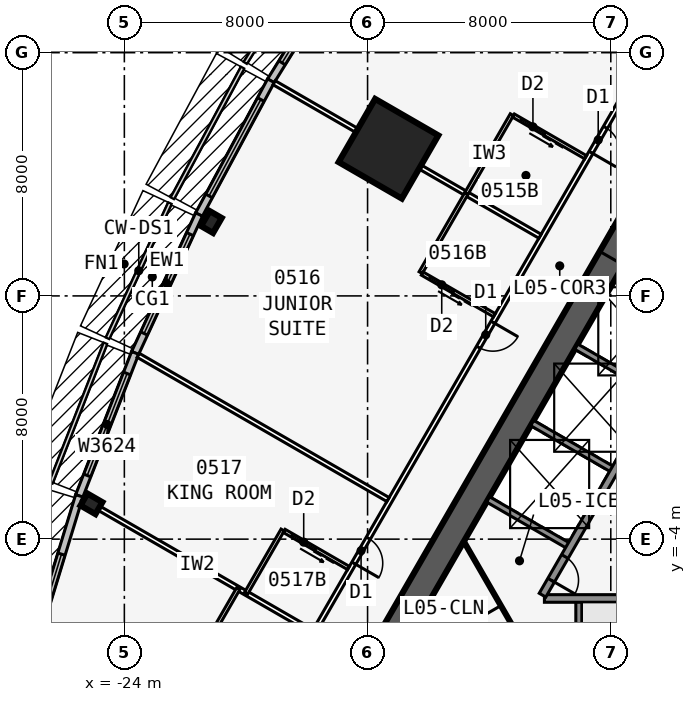
"""IFC4 building model, lengths in metres.
Left out: names, types, materials, properties, quantities, classifications, styles, units other than length and angle.
Written with IfcOpenShell. Run it as: python <this file> out.ifc"""

import sys

from ifc_helpers import new_model, si_unit, direction, frame, frame_2d, origin, origin_2d, place, context, subcontext, project, spatial, rectangle, i_section, extrude, element, fill, save


model = new_model("IFC4")
c1 = context("Model", 3, precision=1e-05, world=origin(), true_north=direction((0.0, 1.0)))
c2 = subcontext(c1, "Body", "Model", "MODEL_VIEW")
j1 = project(units=[si_unit("LENGTHUNIT", "METRE"), si_unit("PLANEANGLEUNIT", "RADIAN")], contexts=[c1])
p1 = place(None, origin())
s1 = spatial("IfcSite", under=j1, at=p1, CompositionType="ELEMENT")
p2 = place(p1, origin())
s2 = spatial("IfcBuilding", under=s1, at=p2, CompositionType="ELEMENT")
p3 = place(p2, frame((0.0, 0.0, 28.5)))
s3 = spatial("IfcBuildingStorey", under=s2, at=p3, CompositionType="ELEMENT", Elevation=28.5)
p4 = place(p3, frame((-10.183, -5.951, 0.0), z_axis=(0.0, 0.0, 1.0), x_axis=(1.0, 0.0, 0.0)))
e1 = element("IfcWall", 1, at=p4, inside=s3, PredefinedType="SOLIDWALL", context=c2, shape_type="SweptSolid", body=[
    extrude(rectangle(XDim=7.633, YDim=0.25, at=frame_2d((3.816, 0.0))), origin(), (0.0, 0.0, 1.0), 3.235),
])
p5 = place(p3, frame((-9.05, -5.951, 0.0), z_axis=(0.0, 0.0, 1.0), x_axis=(0.0, -1.0, 0.0)))
e2 = element("IfcWall", 2, at=p5, inside=s3, PredefinedType="SOLIDWALL", context=c2, shape_type="SweptSolid", body=[
    extrude(rectangle(XDim=3.125, YDim=0.2, at=frame_2d((1.562, 0.0))), origin(), (0.0, 0.0, 1.0), 3.235),
])
p6 = place(p3, frame((0.0, 19.052, 0.0), z_axis=(0.0, 0.0, 1.0), x_axis=(-0.499999749417, -0.866025548458, 0.0)))
e3 = element("IfcWall", 3, at=p6, inside=s3, PredefinedType="SHEAR", context=c2, shape_type="SweptSolid", body=[
    extrude(rectangle(XDim=33.0, YDim=0.9, at=frame_2d((16.5, 0.0))), origin(), (0.0, 0.0, 1.0), 3.4),
])
p7 = place(p6, frame((14.15, 0.0, 0.0)))
e4 = element("IfcOpeningElement", 4, at=p7, cuts=e3, PredefinedType="OPENING", context=c2, shape_type="SweptSolid", body=[
    extrude(rectangle(XDim=1.8, YDim=2.13, at=frame_2d((0.9, 1.065))), frame((0.0, 0.46, 0.0), z_axis=(0.0, -1.0, 0.0), x_axis=(1.0, 0.0, 0.0)), (0.0, 0.0, 1.0), 0.92),
])
p8 = place(p6, frame((12.6, 0.0, 0.0)))
e5 = element("IfcOpeningElement", 5, at=p8, cuts=e3, PredefinedType="OPENING", context=c2, shape_type="SweptSolid", body=[
    extrude(rectangle(XDim=1.0, YDim=2.13, at=frame_2d((0.5, 1.065))), frame((0.0, 0.46, 0.0), z_axis=(0.0, -1.0, 0.0), x_axis=(1.0, 0.0, 0.0)), (0.0, 0.0, 1.0), 0.92),
])
p9 = place(p3, frame((-4.929, 3.365, 0.0), z_axis=(0.0, 0.0, 1.0), x_axis=(-0.499991433582, -0.866030349552, 0.0)))
e6 = element("IfcWall", 6, at=p9, inside=s3, PredefinedType="SOLIDWALL", context=c2, shape_type="SweptSolid", body=[
    extrude(rectangle(XDim=10.633, YDim=0.25, at=frame_2d((5.316, 0.0))), origin(), (0.0, 0.0, 1.0), 3.235),
])
p10 = place(p9, frame((9.164, 0.0, 0.0)))
e7 = element("IfcOpeningElement", 7, at=p10, cuts=e6, PredefinedType="OPENING", context=c2, shape_type="SweptSolid", body=[
    extrude(rectangle(XDim=0.9, YDim=2.13, at=frame_2d((0.45, 1.065))), frame((0.0, 0.135, 0.0), z_axis=(0.0, -1.0, 0.0), x_axis=(1.0, 0.0, 0.0)), (0.0, 0.0, 1.0), 0.27),
])
for number, where, z_axis, x_axis in (
    (8, (-6.429, 0.767, 0.0), (0.0, 0.0, 1.0), (-0.866, 0.5, 0.0)),
    (9, (-7.879, -1.744, 0.0), (0.0, 0.0, 1.0), (-0.866, 0.5, 0.0)),
    (10, (-9.329, -4.256, 0.0), (0.0, 0.0, 1.0), (-0.866, 0.5, 0.0)),
):
    element("IfcWall", number, at=place(p3, frame(where, z_axis=z_axis, x_axis=x_axis)), inside=s3, PredefinedType="SOLIDWALL", context=c2, shape_type="SweptSolid", body=[
        extrude(rectangle(XDim=3.125, YDim=0.2, at=frame_2d((1.562, 0.0))), origin(), (0.0, 0.0, 1.0), 3.235),
    ])
for number, where, z_axis, x_axis in (
    (11, (-21.137, 6.43, 0.0), (0.0, 0.0, 1.0), (-0.866, 0.5, 0.0)),
    (12, (-25.083, -2.839, 0.0), (0.0, 0.0, 1.0), (-0.5, -0.866, 0.0)),
):
    element("IfcColumn", number, at=place(p3, frame(where, z_axis=z_axis, x_axis=x_axis)), inside=s3, PredefinedType="COLUMN", context=c2, shape_type="SweptSolid", body=[
        extrude(i_section(OverallWidth=0.455, OverallDepth=0.569, WebThickness=0.078, FlangeThickness=0.125, at=origin_2d()), origin(), (0.0, 0.0, 1.0), 3.4),
    ])
p11 = place(p3, frame((-15.312, 8.84, 0.0), z_axis=(0.0, 0.0, 1.0), x_axis=(-0.866025403784, 0.5, 0.0)))
e13 = element("IfcColumn", 13, at=p11, inside=s3, PredefinedType="COLUMN", context=c2, shape_type="SweptSolid", body=[
    extrude(rectangle(XDim=2.4, YDim=2.4, at=origin_2d()), origin(), (0.0, 0.0, 1.0), 3.4),
])
p12 = place(p3, frame((-16.551, 15.324, 0.0), z_axis=(0.0, 0.0, 1.0), x_axis=(-0.526132807704, -0.850402415717, 0.0)))
e14 = element("IfcWall", 14, at=p12, inside=s3, PredefinedType="STANDARD", context=c2, shape_type="SweptSolid", body=[
    extrude(rectangle(XDim=5.002, YDim=0.25, at=frame_2d((2.501, 0.0))), origin(), (0.0, 0.0, 1.0), 3.235),
])
p13 = place(p12, frame((0.701, 0.0, 0.45)))
e15 = element("IfcOpeningElement", 15, at=p13, cuts=e14, PredefinedType="OPENING", context=c2, shape_type="SweptSolid", body=[
    extrude(rectangle(XDim=3.6, YDim=2.4, at=frame_2d((1.8, 1.2))), frame((0.0, 0.135, 0.0), z_axis=(0.0, -1.0, 0.0), x_axis=(1.0, 0.0, 0.0)), (0.0, 0.0, 1.0), 0.27),
])
p14 = place(p3, frame((-19.178, 11.077, 0.0), z_axis=(0.0, 0.0, 1.0), x_axis=(-0.473412820489, -0.880840678782, 0.0)))
e16 = element("IfcWall", 16, at=p14, inside=s3, PredefinedType="STANDARD", context=c2, shape_type="SweptSolid", body=[
    extrude(rectangle(XDim=5.002, YDim=0.25, at=frame_2d((2.501, 0.0))), origin(), (0.0, 0.0, 1.0), 3.235),
])
p15 = place(p14, frame((0.701, 0.0, 0.45)))
e17 = element("IfcOpeningElement", 17, at=p15, cuts=e16, PredefinedType="OPENING", context=c2, shape_type="SweptSolid", body=[
    extrude(rectangle(XDim=3.6, YDim=2.4, at=frame_2d((1.8, 1.2))), frame((0.0, 0.135, 0.0), z_axis=(0.0, -1.0, 0.0), x_axis=(1.0, 0.0, 0.0)), (0.0, 0.0, 1.0), 0.27),
])
p16 = place(p3, frame((-21.543, 6.678, 0.0), z_axis=(0.0, 0.0, 1.0), x_axis=(-0.419203100754, -0.907892482796, 0.0)))
e18 = element("IfcWall", 18, at=p16, inside=s3, PredefinedType="STANDARD", context=c2, shape_type="SweptSolid", body=[
    extrude(rectangle(XDim=5.021, YDim=0.25, at=frame_2d((2.51, 0.0))), origin(), (0.0, 0.0, 1.0), 3.235),
])
p17 = place(p16, frame((0.71, 0.0, 0.45)))
e19 = element("IfcOpeningElement", 19, at=p17, cuts=e18, PredefinedType="OPENING", context=c2, shape_type="SweptSolid", body=[
    extrude(rectangle(XDim=3.6, YDim=2.4, at=frame_2d((1.8, 1.2))), frame((0.0, 0.135, 0.0), z_axis=(0.0, -1.0, 0.0), x_axis=(1.0, 0.0, 0.0)), (0.0, 0.0, 1.0), 0.27),
])
p18 = place(p3, frame((-23.645, 2.126, 0.0), z_axis=(0.0, 0.0, 1.0), x_axis=(-0.364013463868, -0.931393685894, 0.0)))
e20 = element("IfcWall", 20, at=p18, inside=s3, PredefinedType="STANDARD", context=c2, shape_type="SweptSolid", body=[
    extrude(rectangle(XDim=5.058, YDim=0.25, at=frame_2d((2.529, 0.0))), origin(), (0.0, 0.0, 1.0), 3.235),
])
p19 = place(p18, frame((0.729, 0.0, 0.45)))
e21 = element("IfcOpeningElement", 21, at=p19, cuts=e20, PredefinedType="OPENING", context=c2, shape_type="SweptSolid", body=[
    extrude(rectangle(XDim=3.6, YDim=2.4, at=frame_2d((1.8, 1.2))), frame((0.0, 0.135, 0.0), z_axis=(0.0, -1.0, 0.0), x_axis=(1.0, 0.0, 0.0)), (0.0, 0.0, 1.0), 0.27),
])
p20 = place(p3, frame((-25.483, -2.575, 0.0), z_axis=(0.0, 0.0, 1.0), x_axis=(-0.2919790669, -0.956424709265, 0.0)))
e22 = element("IfcWall", 22, at=p20, inside=s3, PredefinedType="STANDARD", context=c2, shape_type="SweptSolid", body=[
    extrude(rectangle(XDim=8.211, YDim=0.25, at=frame_2d((4.105, 0.0))), origin(), (0.0, 0.0, 1.0), 3.235),
])
p21 = place(p20, frame((2.006, 0.0, 0.45)))
e23 = element("IfcOpeningElement", 23, at=p21, cuts=e22, PredefinedType="OPENING", context=c2, shape_type="SweptSolid", body=[
    extrude(rectangle(XDim=4.2, YDim=2.4, at=frame_2d((2.1, 1.2))), frame((0.0, 0.135, 0.0), z_axis=(0.0, -1.0, 0.0), x_axis=(1.0, 0.0, 0.0)), (0.0, 0.0, 1.0), 0.27),
])
p22 = place(p3, frame((-0.5, 22.836, 0.0), z_axis=(0.0, 0.0, 1.0), x_axis=(-0.500001677587, -0.866024435227, 0.0)))
e24 = element("IfcWall", 24, at=p22, inside=s3, PredefinedType="PARTITIONING", context=c2, shape_type="SweptSolid", body=[
    extrude(rectangle(XDim=39.054, YDim=0.15, at=frame_2d((19.527, 0.0))), origin(), (0.0, 0.0, 1.0), 3.235),
])
p23 = place(p22, frame((1.558, 0.0, 0.0)))
e25 = element("IfcOpeningElement", 25, at=p23, cuts=e24, PredefinedType="OPENING", context=c2, shape_type="SweptSolid", body=[
    extrude(rectangle(XDim=0.95, YDim=2.13, at=frame_2d((0.475, 1.065))), frame((0.0, 0.085, 0.0), z_axis=(0.0, -1.0, 0.0), x_axis=(1.0, 0.0, 0.0)), (0.0, 0.0, 1.0), 0.17),
])
p24 = place(p22, frame((15.352, 0.0, 0.0)))
e26 = element("IfcOpeningElement", 26, at=p24, cuts=e24, PredefinedType="OPENING", context=c2, shape_type="SweptSolid", body=[
    extrude(rectangle(XDim=0.95, YDim=2.13, at=frame_2d((0.475, 1.065))), frame((0.0, 0.085, 0.0), z_axis=(0.0, -1.0, 0.0), x_axis=(1.0, 0.0, 0.0)), (0.0, 0.0, 1.0), 0.17),
])
p25 = place(p22, frame((22.752, 0.0, 0.0)))
e27 = element("IfcOpeningElement", 27, at=p25, cuts=e24, PredefinedType="OPENING", context=c2, shape_type="SweptSolid", body=[
    extrude(rectangle(XDim=0.95, YDim=2.13, at=frame_2d((0.475, 1.065))), frame((0.0, 0.085, 0.0), z_axis=(0.0, -1.0, 0.0), x_axis=(1.0, 0.0, 0.0)), (0.0, 0.0, 1.0), 0.17),
])
p26 = place(p22, frame((30.952, 0.0, 0.0)))
e28 = element("IfcOpeningElement", 28, at=p26, cuts=e24, PredefinedType="OPENING", context=c2, shape_type="SweptSolid", body=[
    extrude(rectangle(XDim=0.95, YDim=2.13, at=frame_2d((0.475, 1.065))), frame((0.0, 0.085, 0.0), z_axis=(0.0, -1.0, 0.0), x_axis=(1.0, 0.0, 0.0)), (0.0, 0.0, 1.0), 0.17),
])
p27 = place(p22, frame((37.752, 0.0, 0.0)))
e29 = element("IfcOpeningElement", 29, at=p27, cuts=e24, PredefinedType="OPENING", context=c2, shape_type="SweptSolid", body=[
    extrude(rectangle(XDim=0.95, YDim=2.13, at=frame_2d((0.475, 1.065))), frame((0.0, 0.085, 0.0), z_axis=(0.0, -1.0, 0.0), x_axis=(1.0, 0.0, 0.0)), (0.0, 0.0, 1.0), 0.17),
])
p28 = place(p3, frame((-10.329, 5.963, 0.0), z_axis=(0.0, 0.0, 1.0), x_axis=(-0.866021688545, 0.500006434927, 0.0)))
e30 = element("IfcWall", 30, at=p28, inside=s3, PredefinedType="PARTITIONING", context=c2, shape_type="SweptSolid", body=[
    extrude(rectangle(XDim=10.096, YDim=0.15, at=frame_2d((5.048, 0.0))), origin(), (0.0, 0.0, 1.0), 2.389),
])
p29 = place(p3, frame((-15.329, -2.697, 0.0), z_axis=(0.0, 0.0, 1.0), x_axis=(-0.866018409083, 0.500012114982, 0.0)))
e31 = element("IfcWall", 31, at=p29, inside=s3, PredefinedType="PARTITIONING", context=c2, shape_type="SweptSolid", body=[
    extrude(rectangle(XDim=9.485, YDim=0.15, at=frame_2d((4.742, 0.0))), origin(), (0.0, 0.0, 1.0), 2.389),
])
p30 = place(p3, frame((-17.829, -7.027, 0.0), z_axis=(0.0, 0.0, 1.0), x_axis=(-0.866032659912, 0.499987431809, 0.0)))
e32 = element("IfcWall", 32, at=p30, inside=s3, PredefinedType="PARTITIONING", context=c2, shape_type="SweptSolid", body=[
    extrude(rectangle(XDim=8.72, YDim=0.15, at=frame_2d((4.36, 0.0))), origin(), (0.0, 0.0, 1.0), 2.389),
])
p31 = place(p3, frame((-11.253, 9.961, 0.0), z_axis=(0.0, 0.0, 1.0), x_axis=(-0.499990139034, -0.866031096941, 0.0)))
e33 = element("IfcWall", 33, at=p31, inside=s3, PredefinedType="PLUMBINGWALL", context=c2, shape_type="SweptSolid", body=[
    extrude(rectangle(XDim=3.0, YDim=0.12, at=frame_2d((1.5, 0.0))), origin(), (0.0, 0.0, 1.0), 3.235),
])
p32 = place(p3, frame((-8.829, 8.561, 0.0), z_axis=(0.0, 0.0, 1.0), x_axis=(-0.866035715982, 0.499982138324, 0.0)))
e34 = element("IfcWall", 34, at=p32, inside=s3, PredefinedType="PLUMBINGWALL", context=c2, shape_type="SweptSolid", body=[
    extrude(rectangle(XDim=2.74, YDim=0.12, at=frame_2d((1.37, 0.0))), origin(), (0.0, 0.0, 1.0), 3.235),
])
p33 = place(p32, frame((1.55, 0.0, 0.0)))
e35 = element("IfcOpeningElement", 35, at=p33, cuts=e34, PredefinedType="OPENING", context=c2, shape_type="SweptSolid", body=[
    extrude(rectangle(XDim=0.9, YDim=2.13, at=frame_2d((0.45, 1.065))), frame((0.0, 0.07, 0.0), z_axis=(0.0, -1.0, 0.0), x_axis=(1.0, 0.0, 0.0)), (0.0, 0.0, 1.0), 0.14),
])
p34 = place(p3, frame((-12.753, 7.363, 0.0), z_axis=(0.0, 0.0, 1.0), x_axis=(-0.50002537861, -0.866010750942, 0.0)))
e36 = element("IfcWall", 36, at=p34, inside=s3, PredefinedType="PLUMBINGWALL", context=c2, shape_type="SweptSolid", body=[
    extrude(rectangle(XDim=3.0, YDim=0.12, at=frame_2d((1.5, 0.0))), origin(), (0.0, 0.0, 1.0), 3.235),
])
p35 = place(p3, frame((-11.829, 3.365, 0.0), z_axis=(0.0, 0.0, 1.0), x_axis=(-0.865997131366, 0.500048966069, 0.0)))
e37 = element("IfcWall", 37, at=p35, inside=s3, PredefinedType="PLUMBINGWALL", context=c2, shape_type="SweptSolid", body=[
    extrude(rectangle(XDim=2.74, YDim=0.12, at=frame_2d((1.37, 0.0))), origin(), (0.0, 0.0, 1.0), 3.235),
])
p36 = place(p35, frame((1.55, 0.0, 0.0)))
e38 = element("IfcOpeningElement", 38, at=p36, cuts=e37, PredefinedType="OPENING", context=c2, shape_type="SweptSolid", body=[
    extrude(rectangle(XDim=0.9, YDim=2.13, at=frame_2d((0.45, 1.065))), frame((0.0, 0.07, 0.0), z_axis=(0.0, -1.0, 0.0), x_axis=(1.0, 0.0, 0.0)), (0.0, 0.0, 1.0), 0.14),
])
p37 = place(p3, frame((-18.793, -3.699, 0.0), z_axis=(0.0, 0.0, 1.0), x_axis=(-0.500001309137, -0.866024647952, 0.0)))
e39 = element("IfcWall", 39, at=p37, inside=s3, PredefinedType="PLUMBINGWALL", context=c2, shape_type="SweptSolid", body=[
    extrude(rectangle(XDim=2.4, YDim=0.12, at=frame_2d((1.2, 0.0))), origin(), (0.0, 0.0, 1.0), 3.235),
])
p38 = place(p3, frame((-16.628, -4.949, 0.0), z_axis=(0.0, 0.0, 1.0), x_axis=(-0.866048967903, 0.499959183527, 0.0)))
e40 = element("IfcWall", 40, at=p38, inside=s3, PredefinedType="PLUMBINGWALL", context=c2, shape_type="SweptSolid", body=[
    extrude(rectangle(XDim=2.44, YDim=0.12, at=frame_2d((1.22, 0.0))), origin(), (0.0, 0.0, 1.0), 3.235),
])
p39 = place(p38, frame((1.25, 0.0, 0.0)))
e41 = element("IfcOpeningElement", 41, at=p39, cuts=e40, PredefinedType="OPENING", context=c2, shape_type="SweptSolid", body=[
    extrude(rectangle(XDim=0.9, YDim=2.13, at=frame_2d((0.45, 1.065))), frame((0.0, 0.07, 0.0), z_axis=(0.0, -1.0, 0.0), x_axis=(1.0, 0.0, 0.0)), (0.0, 0.0, 1.0), 0.14),
])
p40 = place(p3, frame((-20.253, -5.627, 0.0), z_axis=(0.0, 0.0, 1.0), x_axis=(-0.499990139034, -0.866031096941, 0.0)))
e42 = element("IfcWall", 42, at=p40, inside=s3, PredefinedType="PLUMBINGWALL", context=c2, shape_type="SweptSolid", body=[
    extrude(rectangle(XDim=3.0, YDim=0.12, at=frame_2d((1.5, 0.0))), origin(), (0.0, 0.0, 1.0), 3.235),
])
p41 = place(p3, frame((-12.719, -9.076, 0.0), z_axis=(0.0, 0.0, 1.0), x_axis=(-0.499952404951, 0.866052881055, 0.0)))
e43 = element("IfcWall", 43, at=p41, inside=s3, PredefinedType="SOLIDWALL", context=c2, shape_type="SweptSolid", body=[
    extrude(rectangle(XDim=3.002, YDim=0.2, at=frame_2d((1.501, 0.0))), origin(), (0.0, 0.0, 1.0), 3.235),
])
p42 = place(p3, frame((-9.947, -9.076, 0.0), z_axis=(0.0, 0.0, 1.0), x_axis=(-0.500027479704, 0.866009537788, 0.0)))
e44 = element("IfcWall", 44, at=p42, inside=s3, PredefinedType="PARTITIONING", context=c2, shape_type="SweptSolid", body=[
    extrude(rectangle(XDim=5.774, YDim=0.1, at=frame_2d((2.887, 0.0))), origin(), (0.0, 0.0, 1.0), 3.235),
])
p43 = place(p42, frame((2.437, 0.0, 0.0)))
e45 = element("IfcOpeningElement", 45, at=p43, cuts=e44, PredefinedType="OPENING", context=c2, shape_type="SweptSolid", body=[
    extrude(rectangle(XDim=0.9, YDim=2.13, at=frame_2d((0.45, 1.065))), frame((0.0, 0.06, 0.0), z_axis=(0.0, -1.0, 0.0), x_axis=(1.0, 0.0, 0.0)), (0.0, 0.0, 1.0), 0.12),
])
p44 = place(p13, origin())
e46 = element("IfcWindow", 46, at=p44, inside=s3, PartitioningType="SINGLE_PANEL", PredefinedType="WINDOW", context=c2, shape_type="SweptSolid", body=[
    extrude(rectangle(XDim=3.6, YDim=2.4, at=frame_2d((1.8, 1.2))), frame((0.0, 0.03, 0.0), z_axis=(0.0, -1.0, 0.0), x_axis=(1.0, 0.0, 0.0)), (0.0, 0.0, 1.0), 0.06),
])
fill(e15, e46)
p45 = place(p15, origin())
e47 = element("IfcWindow", 47, at=p45, inside=s3, PartitioningType="SINGLE_PANEL", PredefinedType="WINDOW", context=c2, shape_type="SweptSolid", body=[
    extrude(rectangle(XDim=3.6, YDim=2.4, at=frame_2d((1.8, 1.2))), frame((0.0, 0.03, 0.0), z_axis=(0.0, -1.0, 0.0), x_axis=(1.0, 0.0, 0.0)), (0.0, 0.0, 1.0), 0.06),
])
fill(e17, e47)
p46 = place(p17, origin())
e48 = element("IfcWindow", 48, at=p46, inside=s3, PartitioningType="SINGLE_PANEL", PredefinedType="WINDOW", context=c2, shape_type="SweptSolid", body=[
    extrude(rectangle(XDim=3.6, YDim=2.4, at=frame_2d((1.8, 1.2))), frame((0.0, 0.03, 0.0), z_axis=(0.0, -1.0, 0.0), x_axis=(1.0, 0.0, 0.0)), (0.0, 0.0, 1.0), 0.06),
])
fill(e19, e48)
p47 = place(p19, origin())
e49 = element("IfcWindow", 49, at=p47, inside=s3, PartitioningType="SINGLE_PANEL", PredefinedType="WINDOW", context=c2, shape_type="SweptSolid", body=[
    extrude(rectangle(XDim=3.6, YDim=2.4, at=frame_2d((1.8, 1.2))), frame((0.0, 0.03, 0.0), z_axis=(0.0, -1.0, 0.0), x_axis=(1.0, 0.0, 0.0)), (0.0, 0.0, 1.0), 0.06),
])
fill(e21, e49)
p48 = place(p21, origin())
e50 = element("IfcWindow", 50, at=p48, inside=s3, PartitioningType="SINGLE_PANEL", PredefinedType="WINDOW", context=c2, shape_type="SweptSolid", body=[
    extrude(rectangle(XDim=4.2, YDim=2.4, at=frame_2d((2.1, 1.2))), frame((0.0, 0.03, 0.0), z_axis=(0.0, -1.0, 0.0), x_axis=(1.0, 0.0, 0.0)), (0.0, 0.0, 1.0), 0.06),
])
fill(e23, e50)
p49 = place(p33, origin())
e51 = element("IfcDoor", 51, at=p49, inside=s3, OperationType="SLIDING_TO_LEFT", PredefinedType="DOOR", context=c2, shape_type="SweptSolid", body=[
    extrude(rectangle(XDim=0.9, YDim=2.13, at=frame_2d((0.45, 1.065))), frame((0.0, 0.025, 0.0), z_axis=(0.0, -1.0, 0.0), x_axis=(1.0, 0.0, 0.0)), (0.0, 0.0, 1.0), 0.05),
])
fill(e35, e51)
p50 = place(p24, origin())
e52 = element("IfcDoor", 52, at=p50, inside=s3, OperationType="SINGLE_SWING_RIGHT", PredefinedType="DOOR", context=c2, shape_type="SweptSolid", body=[
    extrude(rectangle(XDim=0.95, YDim=2.13, at=frame_2d((0.475, 1.065))), frame((0.0, 0.025, 0.0), z_axis=(0.0, -1.0, 0.0), x_axis=(1.0, 0.0, 0.0)), (0.0, 0.0, 1.0), 0.05),
])
fill(e26, e52)
p51 = place(p36, origin())
e53 = element("IfcDoor", 53, at=p51, inside=s3, OperationType="SLIDING_TO_LEFT", PredefinedType="DOOR", context=c2, shape_type="SweptSolid", body=[
    extrude(rectangle(XDim=0.9, YDim=2.13, at=frame_2d((0.45, 1.065))), frame((0.0, 0.025, 0.0), z_axis=(0.0, -1.0, 0.0), x_axis=(1.0, 0.0, 0.0)), (0.0, 0.0, 1.0), 0.05),
])
fill(e38, e53)
p52 = place(p25, origin())
e54 = element("IfcDoor", 54, at=p52, inside=s3, OperationType="SINGLE_SWING_LEFT", PredefinedType="DOOR", context=c2, shape_type="SweptSolid", body=[
    extrude(rectangle(XDim=0.95, YDim=2.13, at=frame_2d((0.475, 1.065))), frame((0.0, 0.025, 0.0), z_axis=(0.0, -1.0, 0.0), x_axis=(1.0, 0.0, 0.0)), (0.0, 0.0, 1.0), 0.05),
])
fill(e27, e54)
p53 = place(p39, origin())
e55 = element("IfcDoor", 55, at=p53, inside=s3, OperationType="SLIDING_TO_LEFT", PredefinedType="DOOR", context=c2, shape_type="SweptSolid", body=[
    extrude(rectangle(XDim=0.9, YDim=2.13, at=frame_2d((0.45, 1.065))), frame((0.0, 0.025, 0.0), z_axis=(0.0, -1.0, 0.0), x_axis=(1.0, 0.0, 0.0)), (0.0, 0.0, 1.0), 0.05),
])
fill(e41, e55)
p54 = place(p26, origin())
e56 = element("IfcDoor", 56, at=p54, inside=s3, OperationType="SINGLE_SWING_RIGHT", PredefinedType="DOOR", context=c2, shape_type="SweptSolid", body=[
    extrude(rectangle(XDim=0.95, YDim=2.13, at=frame_2d((0.475, 1.065))), frame((0.0, 0.025, 0.0), z_axis=(0.0, -1.0, 0.0), x_axis=(1.0, 0.0, 0.0)), (0.0, 0.0, 1.0), 0.05),
])
fill(e28, e56)
p55 = place(p7, origin())
e57 = element("IfcDoor", 57, at=p55, inside=s3, OperationType="DOUBLE_DOOR_SINGLE_SWING", PredefinedType="DOOR", context=c2, shape_type="SweptSolid", body=[
    extrude(rectangle(XDim=1.8, YDim=2.13, at=frame_2d((0.9, 1.065))), frame((0.0, 0.025, 0.0), z_axis=(0.0, -1.0, 0.0), x_axis=(1.0, 0.0, 0.0)), (0.0, 0.0, 1.0), 0.05),
])
fill(e4, e57)
p56 = place(p43, origin())
e58 = element("IfcDoor", 58, at=p56, inside=s3, OperationType="SINGLE_SWING_RIGHT", PredefinedType="DOOR", context=c2, shape_type="SweptSolid", body=[
    extrude(rectangle(XDim=0.9, YDim=2.13, at=frame_2d((0.45, 1.065))), frame((0.0, 0.025, 0.0), z_axis=(0.0, -1.0, 0.0), x_axis=(1.0, 0.0, 0.0)), (0.0, 0.0, 1.0), 0.05),
])
fill(e45, e58)
p57 = place(p10, origin())
e59 = element("IfcDoor", 59, at=p57, inside=s3, OperationType="SINGLE_SWING_RIGHT", PredefinedType="DOOR", context=c2, shape_type="SweptSolid", body=[
    extrude(rectangle(XDim=0.9, YDim=2.13, at=frame_2d((0.45, 1.065))), frame((0.0, 0.025, 0.0), z_axis=(0.0, -1.0, 0.0), x_axis=(1.0, 0.0, 0.0)), (0.0, 0.0, 1.0), 0.05),
])
fill(e7, e59)
save(model, sys.argv[1])
